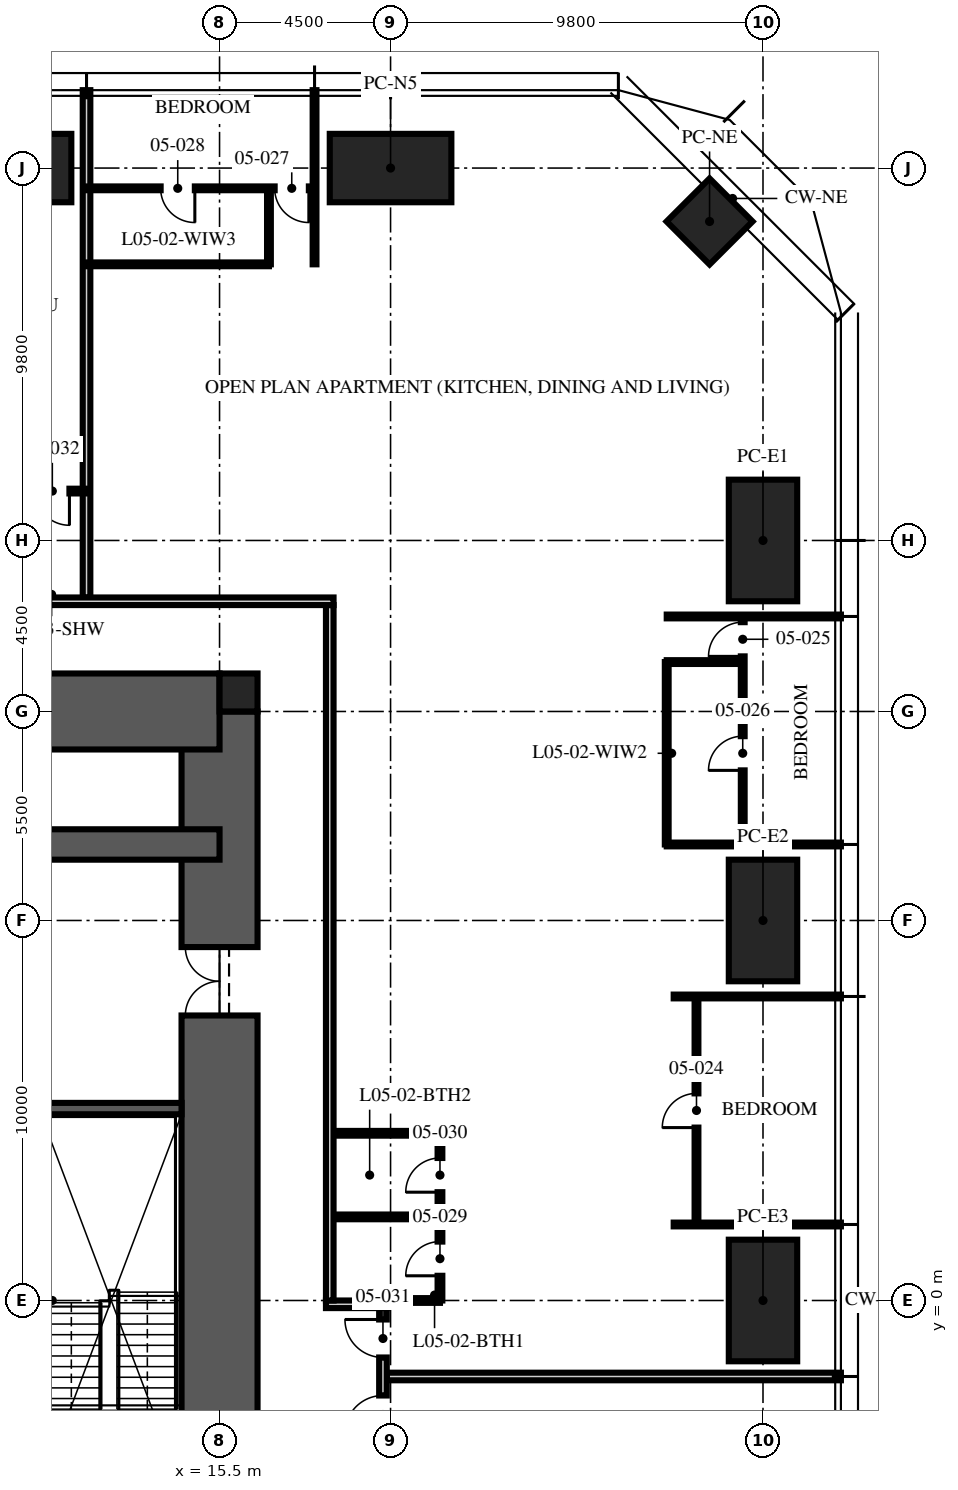
"""IFC4 building model, lengths in metres.
Left out: names, types, materials, properties, quantities, classifications, styles, units other than length and angle.
Written with IfcOpenShell. Run it as: python <this file> out.ifc"""

import sys

from ifc_helpers import new_model, si_unit, direction, frame, frame_2d, origin, origin_2d, place, context, subcontext, project, spatial, rectangle, hollow_rectangle, extrude, element, fill, save


model = new_model("IFC4")
c1 = context("Model", 3, precision=1e-05, world=origin(), true_north=direction((0.0, 1.0)))
c2 = subcontext(c1, "Body", "Model", "MODEL_VIEW")
j1 = project(units=[si_unit("LENGTHUNIT", "METRE"), si_unit("PLANEANGLEUNIT", "RADIAN")], contexts=[c1])
p1 = place(None, origin())
s1 = spatial("IfcSite", under=j1, at=p1, CompositionType="ELEMENT")
p2 = place(p1, origin())
s2 = spatial("IfcBuilding", under=s1, at=p2, CompositionType="ELEMENT")
p3 = place(p2, frame((0.0, 0.0, 24.75)))
s3 = spatial("IfcBuildingStorey", under=s2, at=p3, CompositionType="ELEMENT", Elevation=24.75)
p4 = place(p3, frame((15.5, -15.5, -0.25), z_axis=(0.0, 0.0, 1.0), x_axis=(0.0, 1.0, 0.0)))
e1 = element("IfcWall", 1, at=p4, inside=s3, PredefinedType="SHEAR", context=c2, shape_type="SweptSolid", body=[
    extrude(rectangle(XDim=31.0, YDim=2.0, at=frame_2d((15.5, 0.0))), origin(), (0.0, 0.0, 1.0), 3.75),
])
p5 = place(p4, frame((6.5, 0.0, 0.25)))
e2 = element("IfcOpeningElement", 2, at=p5, cuts=e1, PredefinedType="OPENING", context=c2, shape_type="SweptSolid", body=[
    extrude(rectangle(XDim=1.2, YDim=2.1, at=frame_2d((0.6, 1.05))), frame((0.0, 1.01, 0.0), z_axis=(0.0, -1.0, 0.0), x_axis=(1.0, 0.0, 0.0)), (0.0, 0.0, 1.0), 2.02),
])
p6 = place(p4, frame((23.0, 0.0, 0.25)))
e3 = element("IfcOpeningElement", 3, at=p6, cuts=e1, PredefinedType="OPENING", context=c2, shape_type="SweptSolid", body=[
    extrude(rectangle(XDim=1.8, YDim=2.1, at=frame_2d((0.9, 1.05))), frame((0.0, 1.01, 0.0), z_axis=(0.0, -1.0, 0.0), x_axis=(1.0, 0.0, 0.0)), (0.0, 0.0, 1.0), 2.02),
])
p7 = place(p3, frame((-15.5, 15.5, -0.25), z_axis=(0.0, 0.0, 1.0), x_axis=(1.0, 0.0, 0.0)))
e4 = element("IfcWall", 4, at=p7, inside=s3, PredefinedType="SHEAR", context=c2, shape_type="SweptSolid", body=[
    extrude(rectangle(XDim=31.0, YDim=2.0, at=frame_2d((15.5, 0.0))), origin(), (0.0, 0.0, 1.0), 3.75),
])
p8 = place(p7, frame((10.4, 0.0, 0.25)))
e5 = element("IfcOpeningElement", 5, at=p8, cuts=e4, PredefinedType="OPENING", context=c2, shape_type="SweptSolid", body=[
    extrude(rectangle(XDim=1.1, YDim=2.1, at=frame_2d((0.55, 1.05))), frame((0.0, 1.01, 0.0), z_axis=(0.0, -1.0, 0.0), x_axis=(1.0, 0.0, 0.0)), (0.0, 0.0, 1.0), 2.02),
])
p9 = place(p7, frame((13.5, 0.0, 0.25)))
e6 = element("IfcOpeningElement", 6, at=p9, cuts=e4, PredefinedType="OPENING", context=c2, shape_type="SweptSolid", body=[
    extrude(rectangle(XDim=1.1, YDim=2.1, at=frame_2d((0.55, 1.05))), frame((0.0, 1.01, 0.0), z_axis=(0.0, -1.0, 0.0), x_axis=(1.0, 0.0, 0.0)), (0.0, 0.0, 1.0), 2.02),
])
p10 = place(p7, frame((16.6, 0.0, 0.25)))
e7 = element("IfcOpeningElement", 7, at=p10, cuts=e4, PredefinedType="OPENING", context=c2, shape_type="SweptSolid", body=[
    extrude(rectangle(XDim=1.1, YDim=2.1, at=frame_2d((0.55, 1.05))), frame((0.0, 1.01, 0.0), z_axis=(0.0, -1.0, 0.0), x_axis=(1.0, 0.0, 0.0)), (0.0, 0.0, 1.0), 2.02),
])
p11 = place(p3, frame((-15.5, 12.0, -0.25), z_axis=(0.0, 0.0, 1.0), x_axis=(1.0, 0.0, 0.0)))
e8 = element("IfcWall", 8, at=p11, inside=s3, PredefinedType="SHEAR", context=c2, shape_type="SweptSolid", body=[
    extrude(rectangle(XDim=31.0, YDim=0.8, at=frame_2d((15.5, 0.0))), origin(), (0.0, 0.0, 1.0), 3.75),
])
p12 = place(p3, frame((16.0, 16.0, -0.25), z_axis=(0.0, 0.0, 1.0), x_axis=(1.0, 0.0, 0.0)))
e9 = element("IfcColumn", 9, at=p12, inside=s3, PredefinedType="COLUMN", context=c2, shape_type="SweptSolid", body=[
    extrude(rectangle(XDim=1.0, YDim=1.0, at=origin_2d()), origin(), (0.0, 0.0, 1.0), 3.75),
])
for number, where, z_axis, x_axis in (
    (10, (10.0, 29.8, 0.0), (0.0, 0.0, 1.0), (1.0, 0.0, 0.0)),
    (11, (20.0, 29.8, 0.0), (0.0, 0.0, 1.0), (1.0, 0.0, 0.0)),
    (12, (29.8, 20.0, 0.0), (0.0, 0.0, 1.0), (0.0, 1.0, 0.0)),
    (13, (29.8, 10.0, 0.0), (0.0, 0.0, 1.0), (0.0, 1.0, 0.0)),
    (14, (29.8, 0.0, 0.0), (0.0, 0.0, 1.0), (0.0, 1.0, 0.0)),
):
    element("IfcColumn", number, at=place(p3, frame(where, z_axis=z_axis, x_axis=x_axis)), inside=s3, PredefinedType="COLUMN", context=c2, shape_type="SweptSolid", body=[
        extrude(hollow_rectangle(XDim=3.2, YDim=1.8, WallThickness=0.2, at=origin_2d()), origin(), (0.0, 0.0, 1.0), 3.75),
    ])
p13 = place(p3, frame((28.394, 28.394, 0.0), z_axis=(0.0, 0.0, 1.0), x_axis=(0.707106781187, -0.707106781187, 0.0)))
e15 = element("IfcColumn", 15, at=p13, inside=s3, PredefinedType="COLUMN", context=c2, shape_type="SweptSolid", body=[
    extrude(hollow_rectangle(XDim=1.6, YDim=1.6, WallThickness=0.1, at=origin_2d()), origin(), (0.0, 0.0, 1.0), 3.75),
])
p14 = place(p3, frame((14.5, 5.05, 0.0), z_axis=(0.0, 0.0, 1.0), x_axis=(-1.0, 0.0, 0.0)))
e16 = element("IfcWall", 16, at=p14, inside=s3, PredefinedType="SOLIDWALL", context=c2, shape_type="SweptSolid", body=[
    extrude(rectangle(XDim=3.7, YDim=0.3, at=frame_2d((1.85, 0.0))), origin(), (0.0, 0.0, 1.0), 3.5),
])
p15 = place(p3, frame((19.9, -2.0, 0.0), z_axis=(0.0, 0.0, 1.0), x_axis=(1.0, 0.0, 0.0)))
e17 = element("IfcWall", 17, at=p15, inside=s3, PredefinedType="PARTITIONING", context=c2, shape_type="SweptSolid", body=[
    extrude(rectangle(XDim=11.95, YDim=0.2, at=frame_2d((5.975, 0.0))), origin(), (0.0, 0.0, 1.0), 2.71),
])
for number, where, z_axis, x_axis in (
    (18, (27.45, 2.0, 0.0), (0.0, 0.0, 1.0), (1.0, 0.0, 0.0)),
    (19, (27.45, 8.0, 0.0), (0.0, 0.0, 1.0), (1.0, 0.0, 0.0)),
):
    element("IfcWall", number, at=place(p3, frame(where, z_axis=z_axis, x_axis=x_axis)), inside=s3, PredefinedType="PARTITIONING", context=c2, shape_type="SweptSolid", body=[
        extrude(rectangle(XDim=4.4, YDim=0.1, at=frame_2d((2.2, 0.0))), origin(), (0.0, 0.0, 1.0), 2.71),
    ])
for number, where, z_axis, x_axis in (
    (20, (27.267, 12.0, 0.0), (0.0, 0.0, 1.0), (1.0, 0.0, 0.0)),
    (21, (27.267, 18.0, 0.0), (0.0, 0.0, 1.0), (1.0, 0.0, 0.0)),
    (22, (18.0, 27.267, 0.0), (0.0, 0.0, 1.0), (0.0, 1.0, 0.0)),
):
    element("IfcWall", number, at=place(p3, frame(where, z_axis=z_axis, x_axis=x_axis)), inside=s3, PredefinedType="PARTITIONING", context=c2, shape_type="SweptSolid", body=[
        extrude(rectangle(XDim=4.583, YDim=0.1, at=frame_2d((2.292, 0.0))), origin(), (0.0, 0.0, 1.0), 2.71),
    ])
p16 = place(p3, frame((12.0, 18.5, 0.0), z_axis=(0.0, 0.0, 1.0), x_axis=(0.0, 1.0, 0.0)))
e23 = element("IfcWall", 23, at=p16, inside=s3, PredefinedType="PARTITIONING", context=c2, shape_type="SweptSolid", body=[
    extrude(rectangle(XDim=13.35, YDim=0.2, at=frame_2d((6.675, 0.0))), origin(), (0.0, 0.0, 1.0), 2.71),
])
p17 = place(p3, frame((28.05, 2.0, 0.0), z_axis=(0.0, 0.0, 1.0), x_axis=(0.0, 1.0, 0.0)))
e24 = element("IfcWall", 24, at=p17, inside=s3, PredefinedType="PARTITIONING", context=c2, shape_type="SweptSolid", body=[
    extrude(rectangle(XDim=6.0, YDim=0.1, at=frame_2d((3.0, 0.0))), origin(), (0.0, 0.0, 1.0), 2.61),
])
p18 = place(p17, frame((2.55, 0.0, 0.0)))
e25 = element("IfcOpeningElement", 25, at=p18, cuts=e24, PredefinedType="OPENING", context=c2, shape_type="SweptSolid", body=[
    extrude(rectangle(XDim=0.9, YDim=2.1, at=frame_2d((0.45, 1.05))), frame((0.0, 0.06, 0.0), z_axis=(0.0, -1.0, 0.0), x_axis=(1.0, 0.0, 0.0)), (0.0, 0.0, 1.0), 0.12),
])
p19 = place(p3, frame((29.267, 12.0, 0.0), z_axis=(0.0, 0.0, 1.0), x_axis=(0.0, 1.0, 0.0)))
e26 = element("IfcWall", 26, at=p19, inside=s3, PredefinedType="PARTITIONING", context=c2, shape_type="SweptSolid", body=[
    extrude(rectangle(XDim=6.0, YDim=0.1, at=frame_2d((3.0, 0.0))), origin(), (0.0, 0.0, 1.0), 2.61),
])
p20 = place(p19, frame((4.95, 0.0, 0.0)))
e27 = element("IfcOpeningElement", 27, at=p20, cuts=e26, PredefinedType="OPENING", context=c2, shape_type="SweptSolid", body=[
    extrude(rectangle(XDim=0.9, YDim=2.1, at=frame_2d((0.45, 1.05))), frame((0.0, 0.06, 0.0), z_axis=(0.0, -1.0, 0.0), x_axis=(1.0, 0.0, 0.0)), (0.0, 0.0, 1.0), 0.12),
])
p21 = place(p19, frame((1.95, 0.0, 0.0)))
e28 = element("IfcOpeningElement", 28, at=p21, cuts=e26, PredefinedType="OPENING", context=c2, shape_type="SweptSolid", body=[
    extrude(rectangle(XDim=0.9, YDim=2.1, at=frame_2d((0.45, 1.05))), frame((0.0, 0.06, 0.0), z_axis=(0.0, -1.0, 0.0), x_axis=(1.0, 0.0, 0.0)), (0.0, 0.0, 1.0), 0.12),
])
p22 = place(p3, frame((27.267, 16.8, 0.0), z_axis=(0.0, 0.0, 1.0), x_axis=(1.0, 0.0, 0.0)))
e29 = element("IfcWall", 29, at=p22, inside=s3, PredefinedType="PARTITIONING", context=c2, shape_type="SweptSolid", body=[
    extrude(rectangle(XDim=2.0, YDim=0.1, at=frame_2d((1.0, 0.0))), origin(), (0.0, 0.0, 1.0), 3.5),
])
p23 = place(p3, frame((27.267, 12.0, 0.0), z_axis=(0.0, 0.0, 1.0), x_axis=(0.0, 1.0, 0.0)))
e30 = element("IfcWall", 30, at=p23, inside=s3, PredefinedType="PARTITIONING", context=c2, shape_type="SweptSolid", body=[
    extrude(rectangle(XDim=4.8, YDim=0.1, at=frame_2d((2.4, 0.0))), origin(), (0.0, 0.0, 1.0), 2.61),
])
p24 = place(p3, frame((18.0, 29.267, 0.0), z_axis=(0.0, 0.0, 1.0), x_axis=(-1.0, 0.0, 0.0)))
e31 = element("IfcWall", 31, at=p24, inside=s3, PredefinedType="PARTITIONING", context=c2, shape_type="SweptSolid", body=[
    extrude(rectangle(XDim=6.0, YDim=0.1, at=frame_2d((3.0, 0.0))), origin(), (0.0, 0.0, 1.0), 2.61),
])
p25 = place(p24, frame((0.15, 0.0, 0.0)))
e32 = element("IfcOpeningElement", 32, at=p25, cuts=e31, PredefinedType="OPENING", context=c2, shape_type="SweptSolid", body=[
    extrude(rectangle(XDim=0.9, YDim=2.1, at=frame_2d((0.45, 1.05))), frame((0.0, 0.06, 0.0), z_axis=(0.0, -1.0, 0.0), x_axis=(1.0, 0.0, 0.0)), (0.0, 0.0, 1.0), 0.12),
])
p26 = place(p24, frame((3.15, 0.0, 0.0)))
e33 = element("IfcOpeningElement", 33, at=p26, cuts=e31, PredefinedType="OPENING", context=c2, shape_type="SweptSolid", body=[
    extrude(rectangle(XDim=0.9, YDim=2.1, at=frame_2d((0.45, 1.05))), frame((0.0, 0.06, 0.0), z_axis=(0.0, -1.0, 0.0), x_axis=(1.0, 0.0, 0.0)), (0.0, 0.0, 1.0), 0.12),
])
p27 = place(p3, frame((16.8, 27.267, 0.0), z_axis=(0.0, 0.0, 1.0), x_axis=(0.0, 1.0, 0.0)))
e34 = element("IfcWall", 34, at=p27, inside=s3, PredefinedType="PARTITIONING", context=c2, shape_type="SweptSolid", body=[
    extrude(rectangle(XDim=2.0, YDim=0.1, at=frame_2d((1.0, 0.0))), origin(), (0.0, 0.0, 1.0), 3.5),
])
p28 = place(p3, frame((16.8, 27.267, 0.0), z_axis=(0.0, 0.0, 1.0), x_axis=(-1.0, 0.0, 0.0)))
e35 = element("IfcWall", 35, at=p28, inside=s3, PredefinedType="PARTITIONING", context=c2, shape_type="SweptSolid", body=[
    extrude(rectangle(XDim=4.8, YDim=0.1, at=frame_2d((2.4, 0.0))), origin(), (0.0, 0.0, 1.0), 2.61),
])
p29 = place(p3, frame((21.3, 0.0, 0.0), z_axis=(0.0, 0.0, 1.0), x_axis=(0.0, 1.0, 0.0)))
e36 = element("IfcWall", 36, at=p29, inside=s3, PredefinedType="PARTITIONING", context=c2, shape_type="SweptSolid", body=[
    extrude(rectangle(XDim=4.4, YDim=0.125, at=frame_2d((2.2, 0.0))), origin(), (0.0, 0.0, 1.0), 2.492),
])
p30 = place(p29, frame((0.65, 0.0, 0.0)))
e37 = element("IfcOpeningElement", 37, at=p30, cuts=e36, PredefinedType="OPENING", context=c2, shape_type="SweptSolid", body=[
    extrude(rectangle(XDim=0.9, YDim=2.1, at=frame_2d((0.45, 1.05))), frame((0.0, 0.073, 0.0), z_axis=(0.0, -1.0, 0.0), x_axis=(1.0, 0.0, 0.0)), (0.0, 0.0, 1.0), 0.145),
])
p31 = place(p29, frame((2.85, 0.0, 0.0)))
e38 = element("IfcOpeningElement", 38, at=p31, cuts=e36, PredefinedType="OPENING", context=c2, shape_type="SweptSolid", body=[
    extrude(rectangle(XDim=0.9, YDim=2.1, at=frame_2d((0.45, 1.05))), frame((0.0, 0.073, 0.0), z_axis=(0.0, -1.0, 0.0), x_axis=(1.0, 0.0, 0.0)), (0.0, 0.0, 1.0), 0.145),
])
p32 = place(p3, frame((19.97, 0.0, 0.0), z_axis=(0.0, 0.0, 1.0), x_axis=(1.0, 0.0, 0.0)))
e39 = element("IfcWall", 39, at=p32, inside=s3, PredefinedType="PARTITIONING", context=c2, shape_type="SweptSolid", body=[
    extrude(rectangle(XDim=1.33, YDim=0.125, at=frame_2d((0.665, 0.0))), origin(), (0.0, 0.0, 1.0), 2.492),
])
for number, where, z_axis, x_axis in (
    (40, (18.5, 2.2, 0.0), (0.0, 0.0, 1.0), (1.0, 0.0, 0.0)),
    (41, (18.5, 4.4, 0.0), (0.0, 0.0, 1.0), (1.0, 0.0, 0.0)),
):
    element("IfcWall", number, at=place(p3, frame(where, z_axis=z_axis, x_axis=x_axis)), inside=s3, PredefinedType="PARTITIONING", context=c2, shape_type="SweptSolid", body=[
        extrude(rectangle(XDim=2.8, YDim=0.125, at=frame_2d((1.4, 0.0))), origin(), (0.0, 0.0, 1.0), 3.5),
    ])
p33 = place(p3, frame((12.0, 21.3, 0.0), z_axis=(0.0, 0.0, 1.0), x_axis=(-1.0, 0.0, 0.0)))
e42 = element("IfcWall", 42, at=p33, inside=s3, PredefinedType="PARTITIONING", context=c2, shape_type="SweptSolid", body=[
    extrude(rectangle(XDim=1.8, YDim=0.125, at=frame_2d((0.9, 0.0))), origin(), (0.0, 0.0, 1.0), 3.5),
])
p34 = place(p33, frame((0.45, 0.0, 0.0)))
e43 = element("IfcOpeningElement", 43, at=p34, cuts=e42, PredefinedType="OPENING", context=c2, shape_type="SweptSolid", body=[
    extrude(rectangle(XDim=0.9, YDim=2.1, at=frame_2d((0.45, 1.05))), frame((0.0, 0.073, 0.0), z_axis=(0.0, -1.0, 0.0), x_axis=(1.0, 0.0, 0.0)), (0.0, 0.0, 1.0), 0.145),
])
p35 = place(p3, frame((18.3, -0.1, 0.0), z_axis=(0.0, 0.0, 1.0), x_axis=(1.0, 0.0, 0.0)))
e44 = element("IfcWall", 44, at=p35, inside=s3, PredefinedType="PARTITIONING", context=c2, shape_type="SweptSolid", body=[
    extrude(rectangle(XDim=1.6, YDim=0.2, at=frame_2d((0.8, 0.0))), origin(), (0.0, 0.0, 1.0), 2.492),
])
p36 = place(p3, frame((19.8, -3.8, 0.0), z_axis=(0.0, 0.0, 1.0), x_axis=(0.0, 1.0, 0.0)))
e45 = element("IfcWall", 45, at=p36, inside=s3, PredefinedType="PARTITIONING", context=c2, shape_type="SweptSolid", body=[
    extrude(rectangle(XDim=3.6, YDim=0.2, at=frame_2d((1.8, 0.0))), origin(), (0.0, 0.0, 1.0), 3.5),
])
p37 = place(p36, frame((0.3, 0.0, 0.0)))
e46 = element("IfcOpeningElement", 46, at=p37, cuts=e45, PredefinedType="OPENING", context=c2, shape_type="SweptSolid", body=[
    extrude(rectangle(XDim=1.0, YDim=2.2, at=frame_2d((0.5, 1.1))), frame((0.0, 0.11, 0.0), z_axis=(0.0, -1.0, 0.0), x_axis=(1.0, 0.0, 0.0)), (0.0, 0.0, 1.0), 0.22),
])
p38 = place(p36, frame((2.3, 0.0, 0.0)))
e47 = element("IfcOpeningElement", 47, at=p38, cuts=e45, PredefinedType="OPENING", context=c2, shape_type="SweptSolid", body=[
    extrude(rectangle(XDim=1.0, YDim=2.2, at=frame_2d((0.5, 1.1))), frame((0.0, 0.11, 0.0), z_axis=(0.0, -1.0, 0.0), x_axis=(1.0, 0.0, 0.0)), (0.0, 0.0, 1.0), 0.22),
])
p39 = place(p3, frame((18.4, 0.0, 0.0), z_axis=(0.0, 0.0, 1.0), x_axis=(0.0, 1.0, 0.0)))
e48 = element("IfcWall", 48, at=p39, inside=s3, PredefinedType="PARTITIONING", context=c2, shape_type="SweptSolid", body=[
    extrude(rectangle(XDim=18.3, YDim=0.2, at=frame_2d((9.15, 0.0))), origin(), (0.0, 0.0, 1.0), 2.3),
])
p40 = place(p3, frame((10.0, 18.4, 0.0), z_axis=(0.0, 0.0, 1.0), x_axis=(1.0, 0.0, 0.0)))
e49 = element("IfcWall", 49, at=p40, inside=s3, PredefinedType="PARTITIONING", context=c2, shape_type="SweptSolid", body=[
    extrude(rectangle(XDim=8.5, YDim=0.2, at=frame_2d((4.25, 0.0))), origin(), (0.0, 0.0, 1.0), 2.3),
])
p41 = place(p6, origin())
e50 = element("IfcDoor", 50, at=p41, inside=s3, OperationType="DOUBLE_DOOR_SINGLE_SWING", PredefinedType="DOOR", context=c2, shape_type="SweptSolid", body=[
    extrude(rectangle(XDim=1.8, YDim=2.1, at=frame_2d((0.9, 1.05))), frame((0.0, 0.025, 0.0), z_axis=(0.0, -1.0, 0.0), x_axis=(1.0, 0.0, 0.0)), (0.0, 0.0, 1.0), 0.05),
])
fill(e3, e50)
p42 = place(p37, origin())
e51 = element("IfcDoor", 51, at=p42, inside=s3, OperationType="SINGLE_SWING_LEFT", PredefinedType="DOOR", context=c2, shape_type="SweptSolid", body=[
    extrude(rectangle(XDim=1.0, YDim=2.2, at=frame_2d((0.5, 1.1))), frame((0.0, 0.025, 0.0), z_axis=(0.0, -1.0, 0.0), x_axis=(1.0, 0.0, 0.0)), (0.0, 0.0, 1.0), 0.05),
])
fill(e46, e51)
p43 = place(p18, origin())
e52 = element("IfcDoor", 52, at=p43, inside=s3, OperationType="SINGLE_SWING_LEFT", PredefinedType="DOOR", context=c2, shape_type="SweptSolid", body=[
    extrude(rectangle(XDim=0.9, YDim=2.1, at=frame_2d((0.45, 1.05))), frame((0.0, 0.025, 0.0), z_axis=(0.0, -1.0, 0.0), x_axis=(1.0, 0.0, 0.0)), (0.0, 0.0, 1.0), 0.05),
])
fill(e25, e52)
p44 = place(p20, origin())
e53 = element("IfcDoor", 53, at=p44, inside=s3, OperationType="SINGLE_SWING_LEFT", PredefinedType="DOOR", context=c2, shape_type="SweptSolid", body=[
    extrude(rectangle(XDim=0.9, YDim=2.1, at=frame_2d((0.45, 1.05))), frame((0.0, 0.025, 0.0), z_axis=(0.0, -1.0, 0.0), x_axis=(1.0, 0.0, 0.0)), (0.0, 0.0, 1.0), 0.05),
])
fill(e27, e53)
p45 = place(p21, origin())
e54 = element("IfcDoor", 54, at=p45, inside=s3, OperationType="SINGLE_SWING_LEFT", PredefinedType="DOOR", context=c2, shape_type="SweptSolid", body=[
    extrude(rectangle(XDim=0.9, YDim=2.1, at=frame_2d((0.45, 1.05))), frame((0.0, 0.025, 0.0), z_axis=(0.0, -1.0, 0.0), x_axis=(1.0, 0.0, 0.0)), (0.0, 0.0, 1.0), 0.05),
])
fill(e28, e54)
p46 = place(p25, origin())
e55 = element("IfcDoor", 55, at=p46, inside=s3, OperationType="SINGLE_SWING_LEFT", PredefinedType="DOOR", context=c2, shape_type="SweptSolid", body=[
    extrude(rectangle(XDim=0.9, YDim=2.1, at=frame_2d((0.45, 1.05))), frame((0.0, 0.025, 0.0), z_axis=(0.0, -1.0, 0.0), x_axis=(1.0, 0.0, 0.0)), (0.0, 0.0, 1.0), 0.05),
])
fill(e32, e55)
p47 = place(p26, origin())
e56 = element("IfcDoor", 56, at=p47, inside=s3, OperationType="SINGLE_SWING_LEFT", PredefinedType="DOOR", context=c2, shape_type="SweptSolid", body=[
    extrude(rectangle(XDim=0.9, YDim=2.1, at=frame_2d((0.45, 1.05))), frame((0.0, 0.025, 0.0), z_axis=(0.0, -1.0, 0.0), x_axis=(1.0, 0.0, 0.0)), (0.0, 0.0, 1.0), 0.05),
])
fill(e33, e56)
p48 = place(p30, origin())
e57 = element("IfcDoor", 57, at=p48, inside=s3, OperationType="SINGLE_SWING_LEFT", PredefinedType="DOOR", context=c2, shape_type="SweptSolid", body=[
    extrude(rectangle(XDim=0.9, YDim=2.1, at=frame_2d((0.45, 1.05))), frame((0.0, 0.025, 0.0), z_axis=(0.0, -1.0, 0.0), x_axis=(1.0, 0.0, 0.0)), (0.0, 0.0, 1.0), 0.05),
])
fill(e37, e57)
p49 = place(p31, origin())
e58 = element("IfcDoor", 58, at=p49, inside=s3, OperationType="SINGLE_SWING_LEFT", PredefinedType="DOOR", context=c2, shape_type="SweptSolid", body=[
    extrude(rectangle(XDim=0.9, YDim=2.1, at=frame_2d((0.45, 1.05))), frame((0.0, 0.025, 0.0), z_axis=(0.0, -1.0, 0.0), x_axis=(1.0, 0.0, 0.0)), (0.0, 0.0, 1.0), 0.05),
])
fill(e38, e58)
p50 = place(p38, origin())
e59 = element("IfcDoor", 59, at=p50, inside=s3, OperationType="SINGLE_SWING_RIGHT", PredefinedType="DOOR", context=c2, shape_type="SweptSolid", body=[
    extrude(rectangle(XDim=1.0, YDim=2.2, at=frame_2d((0.5, 1.1))), frame((0.0, 0.025, 0.0), z_axis=(0.0, -1.0, 0.0), x_axis=(1.0, 0.0, 0.0)), (0.0, 0.0, 1.0), 0.05),
])
fill(e47, e59)
p51 = place(p34, origin())
e60 = element("IfcDoor", 60, at=p51, inside=s3, OperationType="SINGLE_SWING_LEFT", PredefinedType="DOOR", context=c2, shape_type="SweptSolid", body=[
    extrude(rectangle(XDim=0.9, YDim=2.1, at=frame_2d((0.45, 1.05))), frame((0.0, 0.025, 0.0), z_axis=(0.0, -1.0, 0.0), x_axis=(1.0, 0.0, 0.0)), (0.0, 0.0, 1.0), 0.05),
])
fill(e43, e60)
save(model, sys.argv[1])
